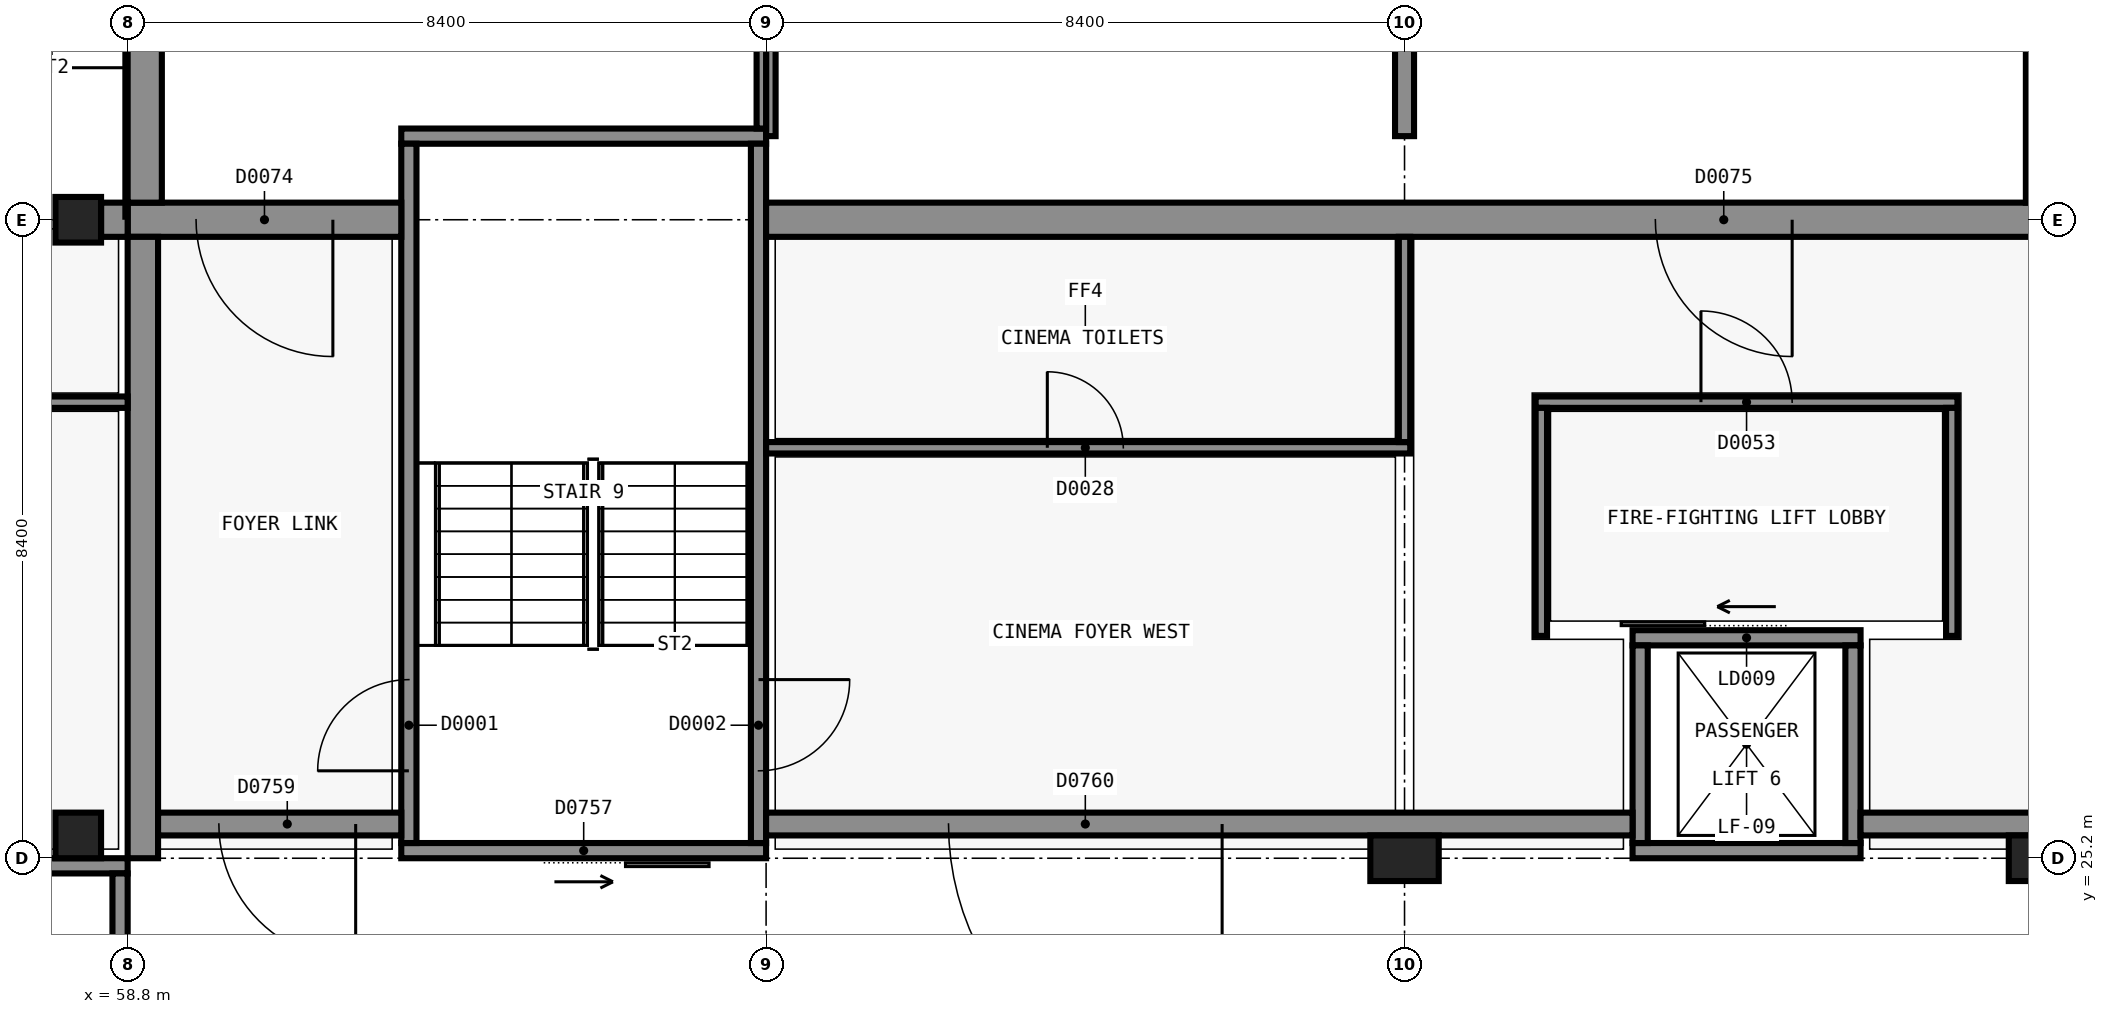
"""IFC4 building model, lengths in metres.
Left out: names, types, materials, properties, quantities, classifications, styles, units other than length and angle.
Written with IfcOpenShell. Run it as: python <this file> out.ifc"""

import sys

from ifc_helpers import new_model, si_unit, direction, frame, frame_2d, origin, origin_2d, place, context, subcontext, project, spatial, polyline, rectangle, outline, extrude, element, fill, save


model = new_model("IFC4")
c1 = context("Model", 3, precision=1e-05, world=origin(), true_north=direction((0.0, 1.0)))
c2 = subcontext(c1, "Body", "Model", "MODEL_VIEW")
j1 = project(units=[si_unit("LENGTHUNIT", "METRE"), si_unit("PLANEANGLEUNIT", "RADIAN")], contexts=[c1])
p1 = place(None, origin())
s1 = spatial("IfcSite", under=j1, at=p1, CompositionType="ELEMENT")
p2 = place(p1, origin())
s2 = spatial("IfcBuilding", under=s1, at=p2, CompositionType="ELEMENT")
p3 = place(p2, origin())
s3 = spatial("IfcBuildingStorey", under=s2, at=p3, CompositionType="ELEMENT", Elevation=0.0)
p4 = place(p3, frame((54.0, 25.1, -0.3), z_axis=(0.0, 0.0, 1.0), x_axis=(1.0, 0.0, 0.0)))
e1 = element("IfcWall", 1, at=p4, inside=s3, PredefinedType="SHEAR", context=c2, shape_type="SweptSolid", body=[
    extrude(rectangle(XDim=4.8, YDim=0.2, at=frame_2d((2.4, 0.0))), origin(), (0.0, 0.0, 1.0), 5.7),
])
p5 = place(p3, frame((58.7, 25.0, -0.3), z_axis=(0.0, 0.0, 1.0), x_axis=(0.0, -1.0, 0.0)))
e2 = element("IfcWall", 2, at=p5, inside=s3, PredefinedType="SHEAR", context=c2, shape_type="SweptSolid", body=[
    extrude(rectangle(XDim=9.2, YDim=0.2, at=frame_2d((4.6, 0.0))), origin(), (0.0, 0.0, 1.0), 5.7),
])
p6 = place(p3, frame((67.2, 25.3, -0.3), z_axis=(0.0, 0.0, 1.0), x_axis=(-1.0, 0.0, 0.0)))
e3 = element("IfcWall", 3, at=p6, inside=s3, PredefinedType="SHEAR", context=c2, shape_type="SweptSolid", body=[
    extrude(rectangle(XDim=4.8, YDim=0.2, at=frame_2d((2.4, 0.0))), origin(), (0.0, 0.0, 1.0), 5.7),
])
p7 = place(p6, frame((1.85, 0.0, 0.0)))
e4 = element("IfcOpeningElement", 4, at=p7, cuts=e3, PredefinedType="OPENING", context=c2, shape_type="SweptSolid", body=[
    extrude(rectangle(XDim=1.1, YDim=2.2, at=frame_2d((0.55, 1.1))), frame((0.0, 0.11, 0.0), z_axis=(0.0, -1.0, 0.0), x_axis=(1.0, 0.0, 0.0)), (0.0, 0.0, 1.0), 0.22),
])
p8 = place(p3, frame((62.4, 34.7, -0.3), z_axis=(0.0, 0.0, 1.0), x_axis=(1.0, 0.0, 0.0)))
e5 = element("IfcWall", 5, at=p8, inside=s3, PredefinedType="SHEAR", context=c2, shape_type="SweptSolid", body=[
    extrude(rectangle(XDim=4.8, YDim=0.2, at=frame_2d((2.4, 0.0))), origin(), (0.0, 0.0, 1.0), 5.7),
])
p9 = place(p3, frame((62.5, 25.4, -0.3), z_axis=(0.0, 0.0, 1.0), x_axis=(0.0, 1.0, 0.0)))
e6 = element("IfcWall", 6, at=p9, inside=s3, PredefinedType="SHEAR", context=c2, shape_type="SweptSolid", body=[
    extrude(rectangle(XDim=9.2, YDim=0.2, at=frame_2d((4.6, 0.0))), origin(), (0.0, 0.0, 1.0), 5.7),
])
p10 = place(p9, frame((0.95, 0.0, 0.3)))
e7 = element("IfcOpeningElement", 7, at=p10, cuts=e6, PredefinedType="OPENING", context=c2, shape_type="SweptSolid", body=[
    extrude(rectangle(XDim=1.2, YDim=2.1, at=frame_2d((0.6, 1.05))), frame((0.0, 0.11, 0.0), z_axis=(0.0, -1.0, 0.0), x_axis=(1.0, 0.0, 0.0)), (0.0, 0.0, 1.0), 0.22),
])
p11 = place(p3, frame((67.1, 34.6, -0.3), z_axis=(0.0, 0.0, 1.0), x_axis=(0.0, -1.0, 0.0)))
e8 = element("IfcWall", 8, at=p11, inside=s3, PredefinedType="SHEAR", context=c2, shape_type="SweptSolid", body=[
    extrude(rectangle(XDim=9.2, YDim=0.2, at=frame_2d((4.6, 0.0))), origin(), (0.0, 0.0, 1.0), 5.7),
])
p12 = place(p11, frame((7.05, 0.0, 0.3)))
e9 = element("IfcOpeningElement", 9, at=p12, cuts=e8, PredefinedType="OPENING", context=c2, shape_type="SweptSolid", body=[
    extrude(rectangle(XDim=1.2, YDim=2.1, at=frame_2d((0.6, 1.05))), frame((0.0, 0.11, 0.0), z_axis=(0.0, -1.0, 0.0), x_axis=(1.0, 0.0, 0.0)), (0.0, 0.0, 1.0), 0.22),
])
p13 = place(p3, frame((81.6, 25.3, -1.6), z_axis=(0.0, 0.0, 1.0), x_axis=(-1.0, 0.0, 0.0)))
e10 = element("IfcWall", 10, at=p13, inside=s3, PredefinedType="SHEAR", context=c2, shape_type="SweptSolid", body=[
    extrude(rectangle(XDim=3.0, YDim=0.2, at=frame_2d((1.5, 0.0))), origin(), (0.0, 0.0, 1.0), 7.0),
])
p14 = place(p3, frame((78.6, 28.1, -1.6), z_axis=(0.0, 0.0, 1.0), x_axis=(1.0, 0.0, 0.0)))
e11 = element("IfcWall", 11, at=p14, inside=s3, PredefinedType="SHEAR", context=c2, shape_type="SweptSolid", body=[
    extrude(rectangle(XDim=3.0, YDim=0.2, at=frame_2d((1.5, 0.0))), origin(), (0.0, 0.0, 1.0), 7.0),
])
p15 = place(p14, frame((0.95, 0.0, 1.6)))
e12 = element("IfcOpeningElement", 12, at=p15, cuts=e11, PredefinedType="OPENING", context=c2, shape_type="SweptSolid", body=[
    extrude(rectangle(XDim=1.1, YDim=2.1, at=frame_2d((0.55, 1.05))), frame((0.0, 0.11, 0.0), z_axis=(0.0, -1.0, 0.0), x_axis=(1.0, 0.0, 0.0)), (0.0, 0.0, 1.0), 0.22),
])
for number, where, z_axis, x_axis in (
    (13, (78.7, 25.4, -1.6), (0.0, 0.0, 1.0), (0.0, 1.0, 0.0)),
    (14, (81.5, 28.0, -1.6), (0.0, 0.0, 1.0), (0.0, -1.0, 0.0)),
):
    element("IfcWall", number, at=place(p3, frame(where, z_axis=z_axis, x_axis=x_axis)), inside=s3, PredefinedType="SHEAR", context=c2, shape_type="SweptSolid", body=[
        extrude(rectangle(XDim=2.6, YDim=0.2, at=frame_2d((1.3, 0.0))), origin(), (0.0, 0.0, 1.0), 7.0),
    ])
p16 = place(p3, frame((62.4, 33.6, -0.3), z_axis=(0.0, 0.0, 1.0), x_axis=(-1.0, 0.0, 0.0)))
e15 = element("IfcWall", 15, at=p16, inside=s3, PredefinedType="SHEAR", context=c2, shape_type="SweptSolid", body=[
    extrude(rectangle(XDim=3.6, YDim=0.45, at=frame_2d((1.8, 0.0))), origin(), (0.0, 0.0, 1.0), 5.7),
])
p17 = place(p16, frame((0.9, 0.0, 0.3)))
e16 = element("IfcOpeningElement", 16, at=p17, cuts=e15, PredefinedType="OPENING", context=c2, shape_type="SweptSolid", body=[
    extrude(rectangle(XDim=1.8, YDim=2.1, at=frame_2d((0.9, 1.05))), frame((0.0, 0.235, 0.0), z_axis=(0.0, -1.0, 0.0), x_axis=(1.0, 0.0, 0.0)), (0.0, 0.0, 1.0), 0.47),
])
p18 = place(p3, frame((84.225, 33.6, -0.3), z_axis=(0.0, 0.0, 1.0), x_axis=(-1.0, 0.0, 0.0)))
e17 = element("IfcWall", 17, at=p18, inside=s3, PredefinedType="SHEAR", context=c2, shape_type="SweptSolid", body=[
    extrude(rectangle(XDim=17.025, YDim=0.45, at=frame_2d((8.513, 0.0))), origin(), (0.0, 0.0, 1.0), 5.7),
])
p19 = place(p18, frame((3.525, 0.0, 0.3)))
e18 = element("IfcOpeningElement", 18, at=p19, cuts=e17, PredefinedType="OPENING", context=c2, shape_type="SweptSolid", body=[
    extrude(rectangle(XDim=1.8, YDim=2.1, at=frame_2d((0.9, 1.05))), frame((0.0, 0.235, 0.0), z_axis=(0.0, -1.0, 0.0), x_axis=(1.0, 0.0, 0.0)), (0.0, 0.0, 1.0), 0.47),
])
p20 = place(p3, frame((59.025, 33.825, -0.3), z_axis=(0.0, 0.0, 1.0), x_axis=(0.0, 1.0, 0.0)))
e19 = element("IfcWall", 19, at=p20, inside=s3, PredefinedType="SHEAR", context=c2, shape_type="SweptSolid", body=[
    extrude(rectangle(XDim=23.775, YDim=0.45, at=frame_2d((11.888, 0.0))), origin(), (0.0, 0.0, 1.0), 5.7),
])
p21 = place(p20, frame((19.275, 0.0, 0.3)))
e20 = element("IfcOpeningElement", 20, at=p21, cuts=e19, PredefinedType="OPENING", context=c2, shape_type="SweptSolid", body=[
    extrude(rectangle(XDim=1.8, YDim=2.1, at=frame_2d((0.9, 1.05))), frame((0.0, 0.235, 0.0), z_axis=(0.0, -1.0, 0.0), x_axis=(1.0, 0.0, 0.0)), (0.0, 0.0, 1.0), 0.47),
])
p22 = place(p3, frame((84.0, 58.575, -0.3), z_axis=(0.0, 0.0, 1.0), x_axis=(0.0, -1.0, 0.0)))
e21 = element("IfcWall", 21, at=p22, inside=s3, PredefinedType="SHEAR", context=c2, shape_type="SweptSolid", body=[
    extrude(rectangle(XDim=24.75, YDim=0.45, at=frame_2d((12.375, 0.0))), origin(), (0.0, 0.0, 1.0), 5.7),
])
p23 = place(p3, frame((59.0, 25.2, -0.3), z_axis=(0.0, 0.0, 1.0), x_axis=(0.0, 1.0, 0.0)))
e22 = element("IfcWall", 22, at=p23, inside=s3, PredefinedType="SHEAR", context=c2, shape_type="SweptSolid", body=[
    extrude(rectangle(XDim=8.175, YDim=0.4, at=frame_2d((4.087, 0.0))), origin(), (0.0, 0.0, 1.0), 5.7),
])
p24 = place(p3, frame((67.262, 34.7, -0.3), z_axis=(0.0, 0.0, 1.0), x_axis=(0.0, 1.0, 0.0)))
e23 = element("IfcWall", 23, at=p24, inside=s3, PredefinedType="SOLIDWALL", context=c2, shape_type="SweptSolid", body=[
    extrude(outline(polyline([(0.0, 0.0), (23.875, 0.0), (23.875, 3.497), (0.0, 0.154), (0.0, 0.0)])), frame((0.0, 0.062, 0.0), z_axis=(0.0, -1.0, 0.0), x_axis=(1.0, 0.0, 0.0)), (0.0, 0.0, 1.0), 0.125),
])
p25 = place(p3, frame((67.137, 34.8, -0.3), z_axis=(0.0, 0.0, 1.0), x_axis=(0.0, 1.0, 0.0)))
e24 = element("IfcWall", 24, at=p25, inside=s3, PredefinedType="SOLIDWALL", context=c2, shape_type="SweptSolid", body=[
    extrude(outline(polyline([(0.0, 0.0), (23.775, 0.0), (23.775, 3.497), (0.0, 0.168), (0.0, 0.0)])), frame((0.0, 0.062, 0.0), z_axis=(0.0, -1.0, 0.0), x_axis=(1.0, 0.0, 0.0)), (0.0, 0.0, 1.0), 0.125),
])
p26 = place(p3, frame((75.6, 34.7, -0.3), z_axis=(0.0, 0.0, 1.0), x_axis=(0.0, 1.0, 0.0)))
e25 = element("IfcWall", 25, at=p26, inside=s3, PredefinedType="SOLIDWALL", context=c2, shape_type="SweptSolid", body=[
    extrude(outline(polyline([(0.0, 0.0), (23.875, 0.0), (23.875, 3.497), (0.0, 0.154), (0.0, 0.0)])), frame((0.0, 0.125, 0.0), z_axis=(0.0, -1.0, 0.0), x_axis=(1.0, 0.0, 0.0)), (0.0, 0.0, 1.0), 0.25),
])
for number, where, z_axis, x_axis in (
    (26, (75.6, 25.2, -0.3), (0.0, 0.0, 1.0), (1.0, 0.0, 0.0)),
    (27, (84.0, 25.2, -0.3), (0.0, 0.0, 1.0), (1.0, 0.0, 0.0)),
):
    element("IfcColumn", number, at=place(p3, frame(where, z_axis=z_axis, x_axis=x_axis)), inside=s3, PredefinedType="COLUMN", context=c2, shape_type="SweptSolid", body=[
        extrude(rectangle(XDim=0.9, YDim=0.6, at=origin_2d()), origin(), (0.0, 0.0, 1.0), 5.7),
    ])
for number, where, z_axis, x_axis in (
    (28, (58.15, 25.5, -0.3), (0.0, 0.0, 1.0), (1.0, 0.0, 0.0)),
    (29, (58.15, 33.6, -0.3), (0.0, 0.0, 1.0), (1.0, 0.0, 0.0)),
):
    element("IfcColumn", number, at=place(p3, frame(where, z_axis=z_axis, x_axis=x_axis)), inside=s3, PredefinedType="COLUMN", context=c2, shape_type="SweptSolid", body=[
        extrude(rectangle(XDim=0.6, YDim=0.6, at=origin_2d()), origin(), (0.0, 0.0, 1.0), 5.7),
    ])
p27 = place(p3, frame((58.625, 33.375, -0.3), z_axis=(0.0, 0.0, 1.0), x_axis=(0.0, 1.0, 0.0)))
e30 = element("IfcWall", 30, at=p27, inside=s3, PredefinedType="SHEAR", context=c2, shape_type="SweptSolid", body=[
    extrude(rectangle(XDim=0.45, YDim=0.35, at=frame_2d((0.225, 0.0))), origin(), (0.0, 0.0, 1.0), 5.7),
])
p28 = place(p3, frame((62.4, 25.65, 0.0), z_axis=(0.0, 0.0, 1.0), x_axis=(-1.0, 0.0, 0.0)))
e31 = element("IfcWall", 31, at=p28, inside=s3, PredefinedType="SOLIDWALL", context=c2, shape_type="SweptSolid", body=[
    extrude(rectangle(XDim=3.2, YDim=0.3, at=frame_2d((1.6, 0.0))), origin(), (0.0, 0.0, 1.0), 5.1),
])
p29 = place(p28, frame((0.6, 0.0, 0.0)))
e32 = element("IfcOpeningElement", 32, at=p29, cuts=e31, PredefinedType="OPENING", context=c2, shape_type="SweptSolid", body=[
    extrude(rectangle(XDim=1.8, YDim=2.2, at=frame_2d((0.9, 1.1))), frame((0.0, 0.16, 0.0), z_axis=(0.0, -1.0, 0.0), x_axis=(1.0, 0.0, 0.0)), (0.0, 0.0, 1.0), 0.32),
])
p30 = place(p3, frame((78.6, 25.65, 0.0), z_axis=(0.0, 0.0, 1.0), x_axis=(-1.0, 0.0, 0.0)))
e33 = element("IfcWall", 33, at=p30, inside=s3, PredefinedType="SOLIDWALL", context=c2, shape_type="SweptSolid", body=[
    extrude(rectangle(XDim=11.4, YDim=0.3, at=frame_2d((5.7, 0.0))), origin(), (0.0, 0.0, 1.0), 5.1),
])
p31 = place(p30, frame((5.4, 0.0, 0.0)))
e34 = element("IfcOpeningElement", 34, at=p31, cuts=e33, PredefinedType="OPENING", context=c2, shape_type="SweptSolid", body=[
    extrude(rectangle(XDim=3.6, YDim=2.8, at=frame_2d((1.8, 1.4))), frame((0.0, 0.16, 0.0), z_axis=(0.0, -1.0, 0.0), x_axis=(1.0, 0.0, 0.0)), (0.0, 0.0, 1.0), 0.32),
])
p32 = place(p3, frame((96.0, 25.65, 0.0), z_axis=(0.0, 0.0, 1.0), x_axis=(-1.0, 0.0, 0.0)))
e35 = element("IfcWall", 35, at=p32, inside=s3, PredefinedType="SOLIDWALL", context=c2, shape_type="SweptSolid", body=[
    extrude(rectangle(XDim=14.4, YDim=0.3, at=frame_2d((7.2, 0.0))), origin(), (0.0, 0.0, 1.0), 5.1),
])
p33 = place(p32, frame((6.0, 0.0, 0.0)))
e36 = element("IfcOpeningElement", 36, at=p33, cuts=e35, PredefinedType="OPENING", context=c2, shape_type="SweptSolid", body=[
    extrude(rectangle(XDim=3.6, YDim=2.8, at=frame_2d((1.8, 1.4))), frame((0.0, 0.16, 0.0), z_axis=(0.0, -1.0, 0.0), x_axis=(1.0, 0.0, 0.0)), (0.0, 0.0, 1.0), 0.32),
])
p34 = place(p32, frame((0.3, 0.0, 0.0)))
e37 = element("IfcOpeningElement", 37, at=p34, cuts=e35, PredefinedType="OPENING", context=c2, shape_type="SweptSolid", body=[
    extrude(rectangle(XDim=2.4, YDim=2.4, at=frame_2d((1.2, 1.2))), frame((0.0, 0.16, 0.0), z_axis=(0.0, -1.0, 0.0), x_axis=(1.0, 0.0, 0.0)), (0.0, 0.0, 1.0), 0.32),
])
p35 = place(p3, frame((67.2, 30.6, 0.0), z_axis=(0.0, 0.0, 1.0), x_axis=(1.0, 0.0, 0.0)))
e38 = element("IfcWall", 38, at=p35, inside=s3, PredefinedType="PARTITIONING", context=c2, shape_type="SweptSolid", body=[
    extrude(rectangle(XDim=8.475, YDim=0.15, at=frame_2d((4.237, 0.0))), origin(), (0.0, 0.0, 1.0), 4.4),
])
p36 = place(p35, frame((3.7, 0.0, 0.0)))
e39 = element("IfcOpeningElement", 39, at=p36, cuts=e38, PredefinedType="OPENING", context=c2, shape_type="SweptSolid", body=[
    extrude(rectangle(XDim=1.0, YDim=2.1, at=frame_2d((0.5, 1.05))), frame((0.0, 0.085, 0.0), z_axis=(0.0, -1.0, 0.0), x_axis=(1.0, 0.0, 0.0)), (0.0, 0.0, 1.0), 0.17),
])
p37 = place(p3, frame((49.725, 31.2, 0.0), z_axis=(0.0, 0.0, 1.0), x_axis=(1.0, 0.0, 0.0)))
e40 = element("IfcWall", 40, at=p37, inside=s3, PredefinedType="PARTITIONING", context=c2, shape_type="SweptSolid", body=[
    extrude(rectangle(XDim=9.075, YDim=0.15, at=frame_2d((4.538, 0.0))), origin(), (0.0, 0.0, 1.0), 4.4),
])
p38 = place(p37, frame((3.975, 0.0, 0.0)))
e41 = element("IfcOpeningElement", 41, at=p38, cuts=e40, PredefinedType="OPENING", context=c2, shape_type="SweptSolid", body=[
    extrude(rectangle(XDim=1.2, YDim=2.1, at=frame_2d((0.6, 1.05))), frame((0.0, 0.085, 0.0), z_axis=(0.0, -1.0, 0.0), x_axis=(1.0, 0.0, 0.0)), (0.0, 0.0, 1.0), 0.17),
])
p39 = place(p3, frame((77.325, 31.2, 0.0), z_axis=(0.0, 0.0, 1.0), x_axis=(1.0, 0.0, 0.0)))
e42 = element("IfcWall", 42, at=p39, inside=s3, PredefinedType="SOLIDWALL", context=c2, shape_type="SweptSolid", body=[
    extrude(rectangle(XDim=5.55, YDim=0.15, at=frame_2d((2.775, 0.0))), origin(), (0.0, 0.0, 1.0), 5.1),
])
p40 = place(p39, frame((2.175, 0.0, 0.0)))
e43 = element("IfcOpeningElement", 43, at=p40, cuts=e42, PredefinedType="OPENING", context=c2, shape_type="SweptSolid", body=[
    extrude(rectangle(XDim=1.2, YDim=2.1, at=frame_2d((0.6, 1.05))), frame((0.0, 0.085, 0.0), z_axis=(0.0, -1.0, 0.0), x_axis=(1.0, 0.0, 0.0)), (0.0, 0.0, 1.0), 0.17),
])
p41 = place(p3, frame((75.6, 30.675, 0.0), z_axis=(0.0, 0.0, 1.0), x_axis=(0.0, 1.0, 0.0)))
e44 = element("IfcWall", 44, at=p41, inside=s3, PredefinedType="PARTITIONING", context=c2, shape_type="SweptSolid", body=[
    extrude(rectangle(XDim=2.7, YDim=0.15, at=frame_2d((1.35, 0.0))), origin(), (0.0, 0.0, 1.0), 4.4),
])
for number, where, z_axis, x_axis in (
    (45, (77.4, 28.125, 0.0), (0.0, 0.0, 1.0), (0.0, 1.0, 0.0)),
    (46, (82.8, 28.125, 0.0), (0.0, 0.0, 1.0), (0.0, 1.0, 0.0)),
):
    element("IfcWall", number, at=place(p3, frame(where, z_axis=z_axis, x_axis=x_axis)), inside=s3, PredefinedType="SOLIDWALL", context=c2, shape_type="SweptSolid", body=[
        extrude(rectangle(XDim=3.0, YDim=0.15, at=frame_2d((1.5, 0.0))), origin(), (0.0, 0.0, 1.0), 5.1),
    ])
p42 = place(p7, origin())
e47 = element("IfcDoor", 47, at=p42, inside=s3, OperationType="SLIDING_TO_LEFT", PredefinedType="DOOR", context=c2, shape_type="SweptSolid", body=[
    extrude(rectangle(XDim=1.1, YDim=2.2, at=frame_2d((0.55, 1.1))), frame((0.0, 0.025, 0.0), z_axis=(0.0, -1.0, 0.0), x_axis=(1.0, 0.0, 0.0)), (0.0, 0.0, 1.0), 0.05),
])
fill(e4, e47)
p43 = place(p29, origin())
e48 = element("IfcDoor", 48, at=p43, inside=s3, OperationType="SINGLE_SWING_LEFT", PredefinedType="DOOR", context=c2, shape_type="SweptSolid", body=[
    extrude(rectangle(XDim=1.8, YDim=2.2, at=frame_2d((0.9, 1.1))), frame((0.0, 0.025, 0.0), z_axis=(0.0, -1.0, 0.0), x_axis=(1.0, 0.0, 0.0)), (0.0, 0.0, 1.0), 0.05),
])
fill(e32, e48)
p44 = place(p31, origin())
e49 = element("IfcDoor", 49, at=p44, inside=s3, OperationType="DOUBLE_DOOR_DOUBLE_SWING", PredefinedType="DOOR", context=c2, shape_type="SweptSolid", body=[
    extrude(rectangle(XDim=3.6, YDim=2.8, at=frame_2d((1.8, 1.4))), frame((0.0, 0.025, 0.0), z_axis=(0.0, -1.0, 0.0), x_axis=(1.0, 0.0, 0.0)), (0.0, 0.0, 1.0), 0.05),
])
fill(e34, e49)
p45 = place(p15, origin())
e50 = element("IfcDoor", 50, at=p45, inside=s3, OperationType="SLIDING_TO_LEFT", PredefinedType="DOOR", context=c2, shape_type="SweptSolid", body=[
    extrude(rectangle(XDim=1.1, YDim=2.1, at=frame_2d((0.55, 1.05))), frame((0.0, 0.025, 0.0), z_axis=(0.0, -1.0, 0.0), x_axis=(1.0, 0.0, 0.0)), (0.0, 0.0, 1.0), 0.05),
])
fill(e12, e50)
p46 = place(p10, origin())
e51 = element("IfcDoor", 51, at=p46, inside=s3, OperationType="SINGLE_SWING_LEFT", PredefinedType="DOOR", context=c2, shape_type="SweptSolid", body=[
    extrude(rectangle(XDim=1.2, YDim=2.1, at=frame_2d((0.6, 1.05))), frame((0.0, 0.025, 0.0), z_axis=(0.0, -1.0, 0.0), x_axis=(1.0, 0.0, 0.0)), (0.0, 0.0, 1.0), 0.05),
])
fill(e7, e51)
p47 = place(p12, origin())
e52 = element("IfcDoor", 52, at=p47, inside=s3, OperationType="SINGLE_SWING_LEFT", PredefinedType="DOOR", context=c2, shape_type="SweptSolid", body=[
    extrude(rectangle(XDim=1.2, YDim=2.1, at=frame_2d((0.6, 1.05))), frame((0.0, 0.025, 0.0), z_axis=(0.0, -1.0, 0.0), x_axis=(1.0, 0.0, 0.0)), (0.0, 0.0, 1.0), 0.05),
])
fill(e9, e52)
p48 = place(p36, origin())
e53 = element("IfcDoor", 53, at=p48, inside=s3, OperationType="SINGLE_SWING_RIGHT", PredefinedType="DOOR", context=c2, shape_type="SweptSolid", body=[
    extrude(rectangle(XDim=1.0, YDim=2.1, at=frame_2d((0.5, 1.05))), frame((0.0, 0.025, 0.0), z_axis=(0.0, -1.0, 0.0), x_axis=(1.0, 0.0, 0.0)), (0.0, 0.0, 1.0), 0.05),
])
fill(e39, e53)
p49 = place(p40, origin())
e54 = element("IfcDoor", 54, at=p49, inside=s3, OperationType="SINGLE_SWING_LEFT", PredefinedType="DOOR", context=c2, shape_type="SweptSolid", body=[
    extrude(rectangle(XDim=1.2, YDim=2.1, at=frame_2d((0.6, 1.05))), frame((0.0, 0.025, 0.0), z_axis=(0.0, -1.0, 0.0), x_axis=(1.0, 0.0, 0.0)), (0.0, 0.0, 1.0), 0.05),
])
fill(e43, e54)
p50 = place(p17, origin())
e55 = element("IfcDoor", 55, at=p50, inside=s3, OperationType="DOUBLE_DOOR_SINGLE_SWING", PredefinedType="DOOR", context=c2, shape_type="SweptSolid", body=[
    extrude(rectangle(XDim=1.8, YDim=2.1, at=frame_2d((0.9, 1.05))), frame((0.0, 0.025, 0.0), z_axis=(0.0, -1.0, 0.0), x_axis=(1.0, 0.0, 0.0)), (0.0, 0.0, 1.0), 0.05),
])
fill(e16, e55)
p51 = place(p19, origin())
e56 = element("IfcDoor", 56, at=p51, inside=s3, OperationType="DOUBLE_DOOR_SINGLE_SWING", PredefinedType="DOOR", context=c2, shape_type="SweptSolid", body=[
    extrude(rectangle(XDim=1.8, YDim=2.1, at=frame_2d((0.9, 1.05))), frame((0.0, 0.025, 0.0), z_axis=(0.0, -1.0, 0.0), x_axis=(1.0, 0.0, 0.0)), (0.0, 0.0, 1.0), 0.05),
])
fill(e18, e56)
save(model, sys.argv[1])
